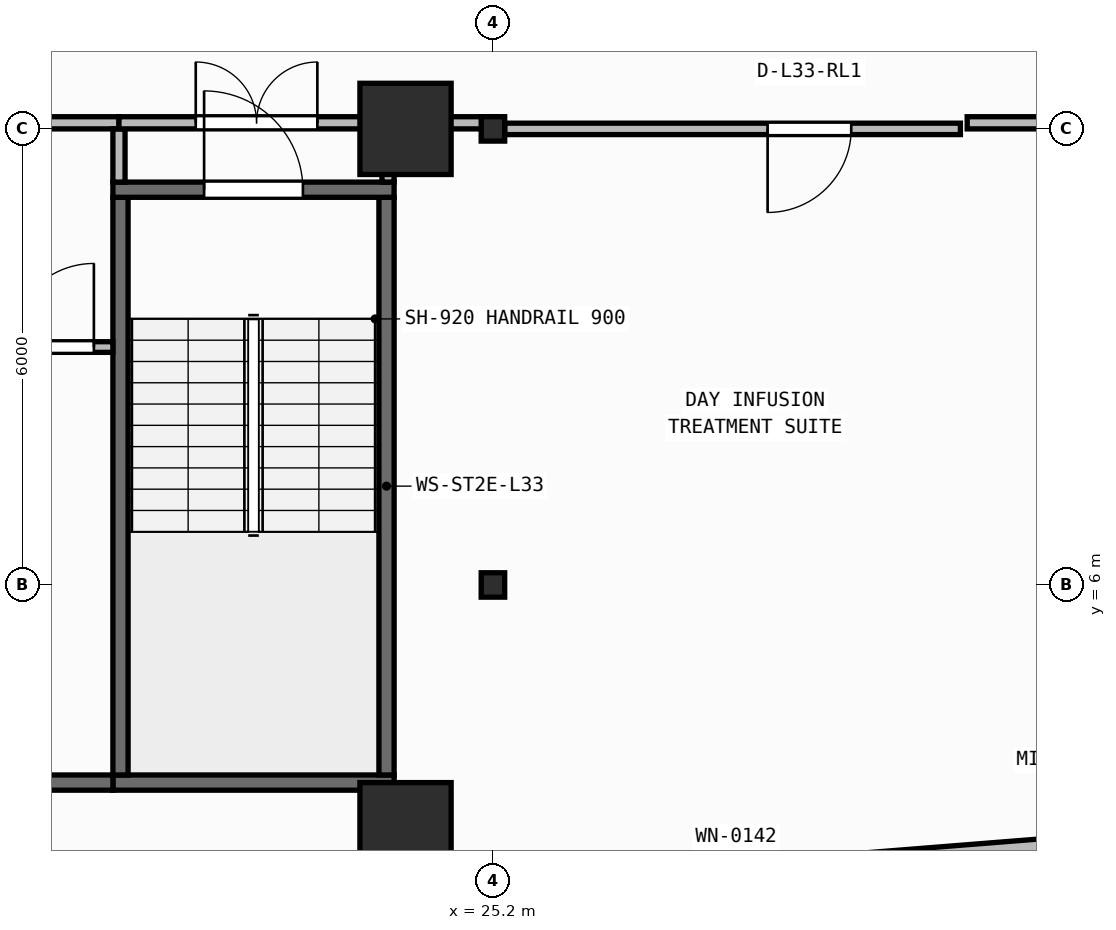
"""IFC4 building model, lengths in metres.
Left out: names, types, materials, properties, quantities, classifications, styles, units other than length and angle.
Written with IfcOpenShell. Run it as: python <this file> out.ifc"""

import sys

from ifc_helpers import new_model, si_unit, direction, frame, frame_2d, origin, origin_2d, place, context, subcontext, project, spatial, rectangle, i_section, extrude, element, fill, save


model = new_model("IFC4")
c1 = context("Model", 3, precision=1e-05, world=origin(), true_north=direction((0.0, 1.0)))
c2 = subcontext(c1, "Body", "Model", "MODEL_VIEW")
j1 = project(units=[si_unit("LENGTHUNIT", "METRE"), si_unit("PLANEANGLEUNIT", "RADIAN")], contexts=[c1])
p1 = place(None, origin())
s1 = spatial("IfcSite", under=j1, at=p1, CompositionType="ELEMENT")
p2 = place(p1, origin())
s2 = spatial("IfcBuilding", under=s1, at=p2, CompositionType="ELEMENT")
p3 = place(p2, frame((0.0, 0.0, 134.95)))
s3 = spatial("IfcBuildingStorey", under=s2, at=p3, CompositionType="ELEMENT", Elevation=134.95)
p4 = place(p3, frame((24.05, 2.8, 0.0), z_axis=(0.0, 0.0, 1.0), x_axis=(1.0, 0.0, 0.0)))
e1 = element("IfcColumn", 1, at=p4, inside=s3, PredefinedType="COLUMN", context=c2, shape_type="SweptSolid", body=[
    extrude(rectangle(XDim=1.2, YDim=1.2, at=origin_2d()), origin(), (0.0, 0.0, 1.0), 3.95),
])
p5 = place(p3, frame((25.2, 6.0, 0.0), z_axis=(0.0, 0.0, 1.0), x_axis=(1.0, 0.0, 0.0)))
e2 = element("IfcColumn", 2, at=p5, inside=s3, PredefinedType="COLUMN", context=c2, shape_type="SweptSolid", body=[
    extrude(i_section(OverallWidth=0.309, OverallDepth=0.321, WebThickness=0.014, FlangeThickness=0.022, FilletRadius=0.017, at=origin_2d()), origin(), (0.0, 0.0, 1.0), 3.95),
])
p6 = place(p3, frame((24.05, 12.0, 0.0), z_axis=(0.0, 0.0, 1.0), x_axis=(1.0, 0.0, 0.0)))
e3 = element("IfcColumn", 3, at=p6, inside=s3, PredefinedType="COLUMN", context=c2, shape_type="SweptSolid", body=[
    extrude(rectangle(XDim=1.2, YDim=1.2, at=origin_2d()), origin(), (0.0, 0.0, 1.0), 3.95),
])
p7 = place(p3, frame((25.2, 12.0, 0.0), z_axis=(0.0, 0.0, 1.0), x_axis=(1.0, 0.0, 0.0)))
e4 = element("IfcColumn", 4, at=p7, inside=s3, PredefinedType="COLUMN", context=c2, shape_type="SweptSolid", body=[
    extrude(i_section(OverallWidth=0.309, OverallDepth=0.321, WebThickness=0.014, FlangeThickness=0.022, FilletRadius=0.017, at=origin_2d()), origin(), (0.0, 0.0, 1.0), 3.95),
])
p8 = place(p3, frame((2.76, 0.173, 0.0), z_axis=(0.0, 0.0, 1.0), x_axis=(0.996857931723, 0.079210251617, 0.0)))
e5 = element("IfcWall", 5, at=p8, inside=s3, PredefinedType="STANDARD", context=c2, shape_type="SweptSolid", body=[
    extrude(rectangle(XDim=51.442, YDim=0.26, at=frame_2d((25.721, 0.0))), origin(), (0.0, 0.0, 1.0), 3.71),
])
p9 = place(p8, frame((24.521, 0.0, 0.9)))
e6 = element("IfcOpeningElement", 6, at=p9, cuts=e5, PredefinedType="OPENING", context=c2, shape_type="SweptSolid", body=[
    extrude(rectangle(XDim=2.4, YDim=1.65, at=frame_2d((1.2, 0.825))), frame((0.0, 0.14, 0.0), z_axis=(0.0, -1.0, 0.0), x_axis=(1.0, 0.0, 0.0)), (0.0, 0.0, 1.0), 0.28),
])
p10 = place(p3, frame((20.2, 3.4, 0.0), z_axis=(0.0, 0.0, 1.0), x_axis=(1.0, 0.0, 0.0)))
e7 = element("IfcWall", 7, at=p10, inside=s3, PredefinedType="SHEAR", context=c2, shape_type="SweptSolid", body=[
    extrude(rectangle(XDim=3.7, YDim=0.2, at=frame_2d((1.85, 0.0))), origin(), (0.0, 0.0, 1.0), 3.71),
])
for number, where, z_axis, x_axis in (
    (8, (20.3, 3.5, 0.0), (0.0, 0.0, 1.0), (0.0, 1.0, 0.0)),
    (9, (23.8, 3.5, 0.0), (0.0, 0.0, 1.0), (0.0, 1.0, 0.0)),
):
    element("IfcWall", number, at=place(p3, frame(where, z_axis=z_axis, x_axis=x_axis)), inside=s3, PredefinedType="SHEAR", context=c2, shape_type="SweptSolid", body=[
        extrude(rectangle(XDim=7.6, YDim=0.2, at=frame_2d((3.8, 0.0))), origin(), (0.0, 0.0, 1.0), 3.71),
    ])
p11 = place(p3, frame((20.2, 11.2, 0.0), z_axis=(0.0, 0.0, 1.0), x_axis=(1.0, 0.0, 0.0)))
e10 = element("IfcWall", 10, at=p11, inside=s3, PredefinedType="SHEAR", context=c2, shape_type="SweptSolid", body=[
    extrude(rectangle(XDim=3.7, YDim=0.2, at=frame_2d((1.85, 0.0))), origin(), (0.0, 0.0, 1.0), 3.71),
])
p12 = place(p11, frame((1.2, 0.0, 0.0)))
e11 = element("IfcOpeningElement", 11, at=p12, cuts=e10, PredefinedType="OPENING", context=c2, shape_type="SweptSolid", body=[
    extrude(rectangle(XDim=1.3, YDim=2.15, at=frame_2d((0.65, 1.075))), frame((0.0, 0.11, 0.0), z_axis=(0.0, -1.0, 0.0), x_axis=(1.0, 0.0, 0.0)), (0.0, 0.0, 1.0), 0.22),
])
p13 = place(p3, frame((6.5, 3.4, 0.0), z_axis=(0.0, 0.0, 1.0), x_axis=(1.0, 0.0, 0.0)))
e12 = element("IfcWall", 12, at=p13, inside=s3, PredefinedType="SHEAR", context=c2, shape_type="SweptSolid", body=[
    extrude(rectangle(XDim=13.7, YDim=0.2, at=frame_2d((6.85, 0.0))), origin(), (0.0, 0.0, 1.0), 3.71),
])
p14 = place(p3, frame((18.61, 9.13, 0.0), z_axis=(0.0, 0.0, 1.0), x_axis=(1.0, 0.0, 0.0)))
e13 = element("IfcWall", 13, at=p14, inside=s3, PredefinedType="PARTITIONING", context=c2, shape_type="SweptSolid", body=[
    extrude(rectangle(XDim=1.59, YDim=0.14, at=frame_2d((0.795, 0.0))), origin(), (0.0, 0.0, 1.0), 3.71),
])
p15 = place(p14, frame((0.24, 0.0, 0.0)))
e14 = element("IfcOpeningElement", 14, at=p15, cuts=e13, PredefinedType="OPENING", context=c2, shape_type="SweptSolid", body=[
    extrude(rectangle(XDim=1.1, YDim=2.1, at=frame_2d((0.55, 1.05))), frame((0.0, 0.08, 0.0), z_axis=(0.0, -1.0, 0.0), x_axis=(1.0, 0.0, 0.0)), (0.0, 0.0, 1.0), 0.16),
])
p16 = place(p3, frame((12.58, 12.08, 0.0), z_axis=(0.0, 0.0, 1.0), x_axis=(1.0, 0.0, 0.0)))
e15 = element("IfcWall", 15, at=p16, inside=s3, PredefinedType="PARTITIONING", context=c2, shape_type="SweptSolid", body=[
    extrude(rectangle(XDim=7.7, YDim=0.16, at=frame_2d((3.85, 0.0))), origin(), (0.0, 0.0, 1.0), 3.083),
])
p17 = place(p16, frame((3.05, 0.0, 0.0)))
e16 = element("IfcOpeningElement", 16, at=p17, cuts=e15, PredefinedType="OPENING", context=c2, shape_type="SweptSolid", body=[
    extrude(rectangle(XDim=1.6, YDim=2.05, at=frame_2d((0.8, 1.025))), frame((0.0, 0.09, 0.0), z_axis=(0.0, -1.0, 0.0), x_axis=(1.0, 0.0, 0.0)), (0.0, 0.0, 1.0), 0.18),
])
p18 = place(p3, frame((20.28, 11.3, 0.0), z_axis=(0.0, 0.0, 1.0), x_axis=(0.0, 1.0, 0.0)))
e17 = element("IfcWall", 17, at=p18, inside=s3, PredefinedType="PARTITIONING", context=c2, shape_type="SweptSolid", body=[
    extrude(rectangle(XDim=0.7, YDim=0.16, at=frame_2d((0.35, 0.0))), origin(), (0.0, 0.0, 1.0), 3.71),
])
p19 = place(p3, frame((20.28, 12.08, 0.0), z_axis=(0.0, 0.0, 1.0), x_axis=(1.0, 0.0, 0.0)))
e18 = element("IfcWall", 18, at=p19, inside=s3, PredefinedType="PARTITIONING", context=c2, shape_type="SweptSolid", body=[
    extrude(rectangle(XDim=3.62, YDim=0.16, at=frame_2d((1.81, 0.0))), origin(), (0.0, 0.0, 1.0), 3.083),
])
p20 = place(p19, frame((1.01, 0.0, 0.0)))
e19 = element("IfcOpeningElement", 19, at=p20, cuts=e18, PredefinedType="OPENING", context=c2, shape_type="SweptSolid", body=[
    extrude(rectangle(XDim=1.6, YDim=2.05, at=frame_2d((0.8, 1.025))), frame((0.0, 0.09, 0.0), z_axis=(0.0, -1.0, 0.0), x_axis=(1.0, 0.0, 0.0)), (0.0, 0.0, 1.0), 0.18),
])
p21 = place(p3, frame((23.82, 11.3, 0.0), z_axis=(0.0, 0.0, 1.0), x_axis=(0.0, 1.0, 0.0)))
e20 = element("IfcWall", 20, at=p21, inside=s3, PredefinedType="PARTITIONING", context=c2, shape_type="SweptSolid", body=[
    extrude(rectangle(XDim=0.7, YDim=0.16, at=frame_2d((0.35, 0.0))), origin(), (0.0, 0.0, 1.0), 3.71),
])
p22 = place(p3, frame((31.35, 12.0, 0.0), z_axis=(0.0, 0.0, 1.0), x_axis=(-1.0, 0.0, 0.0)))
e21 = element("IfcWall", 21, at=p22, inside=s3, PredefinedType="PARTITIONING", context=c2, shape_type="SweptSolid", body=[
    extrude(rectangle(XDim=5.996, YDim=0.15, at=frame_2d((2.998, 0.0))), origin(), (0.0, 0.0, 1.0), 3.083),
])
p23 = place(p22, frame((1.436, 0.0, 0.0)))
e22 = element("IfcOpeningElement", 22, at=p23, cuts=e21, PredefinedType="OPENING", context=c2, shape_type="SweptSolid", body=[
    extrude(rectangle(XDim=1.1, YDim=2.1, at=frame_2d((0.55, 1.05))), frame((0.0, 0.085, 0.0), z_axis=(0.0, -1.0, 0.0), x_axis=(1.0, 0.0, 0.0)), (0.0, 0.0, 1.0), 0.17),
])
p24 = place(p3, frame((24.02, 12.08, 0.0), z_axis=(0.0, 0.0, 1.0), x_axis=(1.0, 0.0, 0.0)))
e23 = element("IfcWall", 23, at=p24, inside=s3, PredefinedType="PARTITIONING", context=c2, shape_type="SweptSolid", body=[
    extrude(rectangle(XDim=1.245, YDim=0.16, at=frame_2d((0.623, 0.0))), origin(), (0.0, 0.0, 1.0), 3.083),
])
p25 = place(p3, frame((31.439, 12.08, 0.0), z_axis=(0.0, 0.0, 1.0), x_axis=(1.0, 0.0, 0.0)))
e24 = element("IfcWall", 24, at=p25, inside=s3, PredefinedType="PARTITIONING", context=c2, shape_type="SweptSolid", body=[
    extrude(rectangle(XDim=2.631, YDim=0.16, at=frame_2d((1.315, 0.0))), origin(), (0.0, 0.0, 1.0), 3.083),
])
p26 = place(p12, origin())
e25 = element("IfcDoor", 25, at=p26, inside=s3, OperationType="SINGLE_SWING_LEFT", PredefinedType="DOOR", context=c2, shape_type="SweptSolid", body=[
    extrude(rectangle(XDim=1.3, YDim=2.15, at=frame_2d((0.65, 1.075))), frame((0.0, 0.025, 0.0), z_axis=(0.0, -1.0, 0.0), x_axis=(1.0, 0.0, 0.0)), (0.0, 0.0, 1.0), 0.05),
])
fill(e11, e25)
p27 = place(p15, origin())
e26 = element("IfcDoor", 26, at=p27, inside=s3, OperationType="SINGLE_SWING_RIGHT", PredefinedType="DOOR", context=c2, shape_type="SweptSolid", body=[
    extrude(rectangle(XDim=1.1, YDim=2.1, at=frame_2d((0.55, 1.05))), frame((0.0, 0.025, 0.0), z_axis=(0.0, -1.0, 0.0), x_axis=(1.0, 0.0, 0.0)), (0.0, 0.0, 1.0), 0.05),
])
fill(e14, e26)
p28 = place(p20, origin())
e27 = element("IfcDoor", 27, at=p28, inside=s3, OperationType="DOUBLE_DOOR_SINGLE_SWING", PredefinedType="DOOR", context=c2, shape_type="SweptSolid", body=[
    extrude(rectangle(XDim=1.6, YDim=2.05, at=frame_2d((0.8, 1.025))), frame((0.0, 0.025, 0.0), z_axis=(0.0, -1.0, 0.0), x_axis=(1.0, 0.0, 0.0)), (0.0, 0.0, 1.0), 0.05),
])
fill(e19, e27)
p29 = place(p23, origin())
e28 = element("IfcDoor", 28, at=p29, inside=s3, OperationType="SINGLE_SWING_RIGHT", PredefinedType="DOOR", context=c2, shape_type="SweptSolid", body=[
    extrude(rectangle(XDim=1.1, YDim=2.1, at=frame_2d((0.55, 1.05))), frame((0.0, 0.025, 0.0), z_axis=(0.0, -1.0, 0.0), x_axis=(1.0, 0.0, 0.0)), (0.0, 0.0, 1.0), 0.05),
])
fill(e22, e28)
save(model, sys.argv[1])
